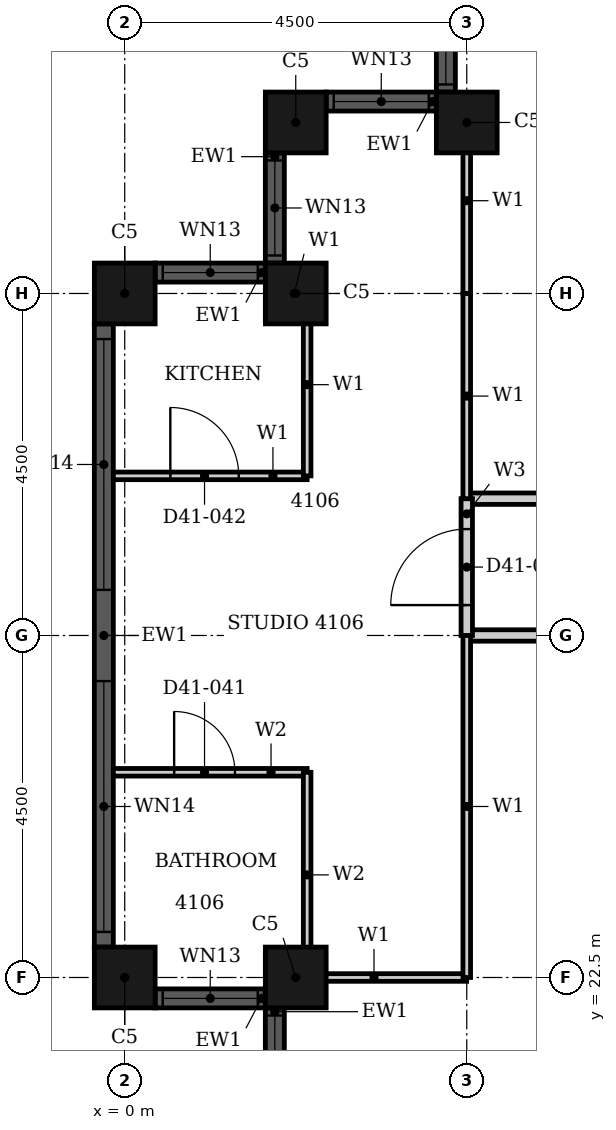
"""IFC4 building model, lengths in metres.
Left out: names, types, materials, properties, quantities, classifications, styles, units other than length and angle.
Written with IfcOpenShell. Run it as: python <this file> out.ifc"""

import sys

from ifc_helpers import new_model, si_unit, direction, frame, frame_2d, origin, origin_2d, place, context, subcontext, project, spatial, rectangle, hollow_rectangle, extrude, element, fill, save


model = new_model("IFC4")
c1 = context("Model", 3, precision=1e-05, world=origin(), true_north=direction((0.0, 1.0)))
c2 = subcontext(c1, "Body", "Model", "MODEL_VIEW")
j1 = project(units=[si_unit("LENGTHUNIT", "METRE"), si_unit("PLANEANGLEUNIT", "RADIAN")], contexts=[c1])
p1 = place(None, origin())
s1 = spatial("IfcSite", under=j1, at=p1, CompositionType="ELEMENT")
p2 = place(p1, origin())
s2 = spatial("IfcBuilding", under=s1, at=p2, CompositionType="ELEMENT")
p3 = place(p2, frame((0.0, 0.0, 165.4)))
s3 = spatial("IfcBuildingStorey", under=s2, at=p3, CompositionType="ELEMENT", Elevation=165.4)
for number, where, z_axis, x_axis in (
    (1, (4.5, 33.75, 0.0), (0.0, 0.0, 1.0), (1.0, 0.0, 0.0)),
    (2, (2.25, 33.75, 0.0), (0.0, 0.0, 1.0), (1.0, 0.0, 0.0)),
    (3, (2.25, 31.5, 0.0), (0.0, 0.0, 1.0), (1.0, 0.0, 0.0)),
    (4, (0.0, 31.5, 0.0), (0.0, 0.0, 1.0), (1.0, 0.0, 0.0)),
    (5, (0.0, 22.5, 0.0), (0.0, 0.0, 1.0), (1.0, 0.0, 0.0)),
    (6, (2.25, 22.5, 0.0), (0.0, 0.0, 1.0), (1.0, 0.0, 0.0)),
):
    element("IfcColumn", number, at=place(p3, frame(where, z_axis=z_axis, x_axis=x_axis)), inside=s3, PredefinedType="COLUMN", context=c2, shape_type="SweptSolid", body=[
        extrude(hollow_rectangle(XDim=0.8, YDim=0.8, WallThickness=0.025, at=origin_2d()), origin(), (0.0, 0.0, 1.0), 3.7),
    ])
p4 = place(p3, frame((4.225, 35.6, 0.0), z_axis=(0.0, 0.0, 1.0), x_axis=(0.0, -1.0, 0.0)))
e7 = element("IfcWall", 7, at=p4, inside=s3, PredefinedType="SOLIDWALL", context=c2, shape_type="SweptSolid", body=[
    extrude(rectangle(XDim=1.45, YDim=0.25, at=frame_2d((0.725, 0.0))), origin(), (0.0, 0.0, 1.0), 3.7),
])
p5 = place(p4, frame((0.1, 0.0, 0.9)))
e8 = element("IfcOpeningElement", 8, at=p5, cuts=e7, PredefinedType="OPENING", context=c2, shape_type="SweptSolid", body=[
    extrude(rectangle(XDim=1.25, YDim=2.08, at=frame_2d((0.625, 1.04))), frame((0.0, 0.135, 0.0), z_axis=(0.0, -1.0, 0.0), x_axis=(1.0, 0.0, 0.0)), (0.0, 0.0, 1.0), 0.27),
])
p6 = place(p3, frame((4.1, 34.025, 0.0), z_axis=(0.0, 0.0, 1.0), x_axis=(-1.0, 0.0, 0.0)))
e9 = element("IfcWall", 9, at=p6, inside=s3, PredefinedType="SOLIDWALL", context=c2, shape_type="SweptSolid", body=[
    extrude(rectangle(XDim=1.45, YDim=0.25, at=frame_2d((0.725, 0.0))), origin(), (0.0, 0.0, 1.0), 3.7),
])
p7 = place(p6, frame((0.1, 0.0, 0.9)))
e10 = element("IfcOpeningElement", 10, at=p7, cuts=e9, PredefinedType="OPENING", context=c2, shape_type="SweptSolid", body=[
    extrude(rectangle(XDim=1.25, YDim=1.85, at=frame_2d((0.625, 0.925))), frame((0.0, 0.135, 0.0), z_axis=(0.0, -1.0, 0.0), x_axis=(1.0, 0.0, 0.0)), (0.0, 0.0, 1.0), 0.27),
])
p8 = place(p3, frame((1.975, 33.35, 0.0), z_axis=(0.0, 0.0, 1.0), x_axis=(0.0, -1.0, 0.0)))
e11 = element("IfcWall", 11, at=p8, inside=s3, PredefinedType="SOLIDWALL", context=c2, shape_type="SweptSolid", body=[
    extrude(rectangle(XDim=1.45, YDim=0.25, at=frame_2d((0.725, 0.0))), origin(), (0.0, 0.0, 1.0), 3.7),
])
p9 = place(p8, frame((0.1, 0.0, 0.9)))
e12 = element("IfcOpeningElement", 12, at=p9, cuts=e11, PredefinedType="OPENING", context=c2, shape_type="SweptSolid", body=[
    extrude(rectangle(XDim=1.25, YDim=1.85, at=frame_2d((0.625, 0.925))), frame((0.0, 0.135, 0.0), z_axis=(0.0, -1.0, 0.0), x_axis=(1.0, 0.0, 0.0)), (0.0, 0.0, 1.0), 0.27),
])
p10 = place(p3, frame((1.85, 31.775, 0.0), z_axis=(0.0, 0.0, 1.0), x_axis=(-1.0, 0.0, 0.0)))
e13 = element("IfcWall", 13, at=p10, inside=s3, PredefinedType="SOLIDWALL", context=c2, shape_type="SweptSolid", body=[
    extrude(rectangle(XDim=1.45, YDim=0.25, at=frame_2d((0.725, 0.0))), origin(), (0.0, 0.0, 1.0), 3.7),
])
p11 = place(p10, frame((0.1, 0.0, 0.9)))
e14 = element("IfcOpeningElement", 14, at=p11, cuts=e13, PredefinedType="OPENING", context=c2, shape_type="SweptSolid", body=[
    extrude(rectangle(XDim=1.25, YDim=1.85, at=frame_2d((0.625, 0.925))), frame((0.0, 0.135, 0.0), z_axis=(0.0, -1.0, 0.0), x_axis=(1.0, 0.0, 0.0)), (0.0, 0.0, 1.0), 0.27),
])
p12 = place(p3, frame((-0.275, 31.1, 0.0), z_axis=(0.0, 0.0, 1.0), x_axis=(0.0, -1.0, 0.0)))
e15 = element("IfcWall", 15, at=p12, inside=s3, PredefinedType="SOLIDWALL", context=c2, shape_type="SweptSolid", body=[
    extrude(rectangle(XDim=8.2, YDim=0.25, at=frame_2d((4.1, 0.0))), origin(), (0.0, 0.0, 1.0), 3.7),
])
p13 = place(p12, frame((0.2, 0.0, 0.45)))
e16 = element("IfcOpeningElement", 16, at=p13, cuts=e15, PredefinedType="OPENING", context=c2, shape_type="SweptSolid", body=[
    extrude(rectangle(XDim=3.3, YDim=2.53, at=frame_2d((1.65, 1.265))), frame((0.0, 0.135, 0.0), z_axis=(0.0, -1.0, 0.0), x_axis=(1.0, 0.0, 0.0)), (0.0, 0.0, 1.0), 0.27),
])
p14 = place(p12, frame((4.7, 0.0, 0.45)))
e17 = element("IfcOpeningElement", 17, at=p14, cuts=e15, PredefinedType="OPENING", context=c2, shape_type="SweptSolid", body=[
    extrude(rectangle(XDim=3.3, YDim=2.53, at=frame_2d((1.65, 1.265))), frame((0.0, 0.135, 0.0), z_axis=(0.0, -1.0, 0.0), x_axis=(1.0, 0.0, 0.0)), (0.0, 0.0, 1.0), 0.27),
])
p15 = place(p3, frame((0.4, 22.225, 0.0), z_axis=(0.0, 0.0, 1.0), x_axis=(1.0, 0.0, 0.0)))
e18 = element("IfcWall", 18, at=p15, inside=s3, PredefinedType="SOLIDWALL", context=c2, shape_type="SweptSolid", body=[
    extrude(rectangle(XDim=1.45, YDim=0.25, at=frame_2d((0.725, 0.0))), origin(), (0.0, 0.0, 1.0), 3.7),
])
p16 = place(p15, frame((0.1, 0.0, 0.9)))
e19 = element("IfcOpeningElement", 19, at=p16, cuts=e18, PredefinedType="OPENING", context=c2, shape_type="SweptSolid", body=[
    extrude(rectangle(XDim=1.25, YDim=1.85, at=frame_2d((0.625, 0.925))), frame((0.0, 0.135, 0.0), z_axis=(0.0, -1.0, 0.0), x_axis=(1.0, 0.0, 0.0)), (0.0, 0.0, 1.0), 0.27),
])
p17 = place(p3, frame((1.975, 22.1, 0.0), z_axis=(0.0, 0.0, 1.0), x_axis=(0.0, -1.0, 0.0)))
e20 = element("IfcWall", 20, at=p17, inside=s3, PredefinedType="SOLIDWALL", context=c2, shape_type="SweptSolid", body=[
    extrude(rectangle(XDim=1.45, YDim=0.25, at=frame_2d((0.725, 0.0))), origin(), (0.0, 0.0, 1.0), 3.7),
])
p18 = place(p17, frame((0.1, 0.0, 0.9)))
e21 = element("IfcOpeningElement", 21, at=p18, cuts=e20, PredefinedType="OPENING", context=c2, shape_type="SweptSolid", body=[
    extrude(rectangle(XDim=1.25, YDim=1.85, at=frame_2d((0.625, 0.925))), frame((0.0, 0.135, 0.0), z_axis=(0.0, -1.0, 0.0), x_axis=(1.0, 0.0, 0.0)), (0.0, 0.0, 1.0), 0.27),
])
p19 = place(p3, frame((4.5, 27.0, 0.0), z_axis=(0.0, 0.0, 1.0), x_axis=(1.0, 0.0, 0.0)))
e22 = element("IfcWall", 22, at=p19, inside=s3, PredefinedType="PARTITIONING", context=c2, shape_type="SweptSolid", body=[
    extrude(rectangle(XDim=13.5, YDim=0.15, at=frame_2d((6.75, 0.0))), origin(), (0.0, 0.0, 1.0), 2.68),
])
p20 = place(p19, frame((5.35, 0.0, 0.0)))
e23 = element("IfcOpeningElement", 23, at=p20, cuts=e22, PredefinedType="OPENING", context=c2, shape_type="SweptSolid", body=[
    extrude(rectangle(XDim=1.0, YDim=2.1, at=frame_2d((0.5, 1.05))), frame((0.0, 0.085, 0.0), z_axis=(0.0, -1.0, 0.0), x_axis=(1.0, 0.0, 0.0)), (0.0, 0.0, 1.0), 0.17),
])
p21 = place(p3, frame((4.5, 28.8, 0.0), z_axis=(0.0, 0.0, 1.0), x_axis=(1.0, 0.0, 0.0)))
e24 = element("IfcWall", 24, at=p21, inside=s3, PredefinedType="PARTITIONING", context=c2, shape_type="SweptSolid", body=[
    extrude(rectangle(XDim=11.699, YDim=0.15, at=frame_2d((5.85, 0.0))), origin(), (0.0, 0.0, 1.0), 3.4),
])
p22 = place(p21, frame((4.0, 0.0, 0.0)))
e25 = element("IfcOpeningElement", 25, at=p22, cuts=e24, PredefinedType="OPENING", context=c2, shape_type="SweptSolid", body=[
    extrude(rectangle(XDim=1.0, YDim=2.1, at=frame_2d((0.5, 1.05))), frame((0.0, 0.085, 0.0), z_axis=(0.0, -1.0, 0.0), x_axis=(1.0, 0.0, 0.0)), (0.0, 0.0, 1.0), 0.17),
])
p23 = place(p3, frame((4.5, 27.0, 0.0), z_axis=(0.0, 0.0, 1.0), x_axis=(0.0, 1.0, 0.0)))
e26 = element("IfcWall", 26, at=p23, inside=s3, PredefinedType="PARTITIONING", context=c2, shape_type="SweptSolid", body=[
    extrude(rectangle(XDim=1.8, YDim=0.15, at=frame_2d((0.9, 0.0))), origin(), (0.0, 0.0, 1.0), 3.4),
])
p24 = place(p23, frame((0.4, 0.0, 0.0)))
e27 = element("IfcOpeningElement", 27, at=p24, cuts=e26, PredefinedType="OPENING", context=c2, shape_type="SweptSolid", body=[
    extrude(rectangle(XDim=1.0, YDim=2.2, at=frame_2d((0.5, 1.1))), frame((0.0, 0.085, 0.0), z_axis=(0.0, -1.0, 0.0), x_axis=(1.0, 0.0, 0.0)), (0.0, 0.0, 1.0), 0.17),
])
p25 = place(p3, frame((2.06, 22.5, 0.0), z_axis=(0.0, 0.0, 1.0), x_axis=(1.0, 0.0, 0.0)))
e28 = element("IfcWall", 28, at=p25, inside=s3, PredefinedType="PARTITIONING", context=c2, shape_type="SweptSolid", body=[
    extrude(rectangle(XDim=2.439, YDim=0.1, at=frame_2d((1.219, 0.0))), origin(), (0.0, 0.0, 1.0), 2.68),
])
p26 = place(p3, frame((-0.15, 29.1, 0.0), z_axis=(0.0, 0.0, 1.0), x_axis=(1.0, 0.0, 0.0)))
e29 = element("IfcWall", 29, at=p26, inside=s3, PredefinedType="PARTITIONING", context=c2, shape_type="SweptSolid", body=[
    extrude(rectangle(XDim=2.55, YDim=0.1, at=frame_2d((1.275, 0.0))), origin(), (0.0, 0.0, 1.0), 3.4),
])
p27 = place(p26, frame((0.75, 0.0, 0.0)))
e30 = element("IfcOpeningElement", 30, at=p27, cuts=e29, PredefinedType="OPENING", context=c2, shape_type="SweptSolid", body=[
    extrude(rectangle(XDim=0.9, YDim=2.1, at=frame_2d((0.45, 1.05))), frame((0.0, 0.06, 0.0), z_axis=(0.0, -1.0, 0.0), x_axis=(1.0, 0.0, 0.0)), (0.0, 0.0, 1.0), 0.12),
])
p28 = place(p3, frame((2.06, 31.5, 0.0), z_axis=(0.0, 0.0, 1.0), x_axis=(1.0, 0.0, 0.0)))
e31 = element("IfcWall", 31, at=p28, inside=s3, PredefinedType="PARTITIONING", context=c2, shape_type="SweptSolid", body=[
    extrude(rectangle(XDim=0.34, YDim=0.1, at=frame_2d((0.17, 0.0))), origin(), (0.0, 0.0, 1.0), 3.4),
])
p29 = place(p3, frame((2.4, 29.1, 0.0), z_axis=(0.0, 0.0, 1.0), x_axis=(0.0, 1.0, 0.0)))
e32 = element("IfcWall", 32, at=p29, inside=s3, PredefinedType="PARTITIONING", context=c2, shape_type="SweptSolid", body=[
    extrude(rectangle(XDim=2.4, YDim=0.1, at=frame_2d((1.2, 0.0))), origin(), (0.0, 0.0, 1.0), 3.4),
])
p30 = place(p3, frame((4.5, 28.8, 0.0), z_axis=(0.0, 0.0, 1.0), x_axis=(0.0, 1.0, 0.0)))
e33 = element("IfcWall", 33, at=p30, inside=s3, PredefinedType="PARTITIONING", context=c2, shape_type="SweptSolid", body=[
    extrude(rectangle(XDim=2.7, YDim=0.1, at=frame_2d((1.35, 0.0))), origin(), (0.0, 0.0, 1.0), 3.4),
])
p31 = place(p3, frame((4.5, 31.501, 0.0), z_axis=(0.0, 0.0, 1.0), x_axis=(0.0, 1.0, 0.0)))
e34 = element("IfcWall", 34, at=p31, inside=s3, PredefinedType="PARTITIONING", context=c2, shape_type="SweptSolid", body=[
    extrude(rectangle(XDim=2.439, YDim=0.1, at=frame_2d((1.219, 0.0))), origin(), (0.0, 0.0, 1.0), 3.4),
])
p32 = place(p3, frame((4.5, 22.5, 0.0), z_axis=(0.0, 0.0, 1.0), x_axis=(0.0, 1.0, 0.0)))
e35 = element("IfcWall", 35, at=p32, inside=s3, PredefinedType="PARTITIONING", context=c2, shape_type="SweptSolid", body=[
    extrude(rectangle(XDim=4.5, YDim=0.1, at=frame_2d((2.25, 0.0))), origin(), (0.0, 0.0, 1.0), 3.4),
])
p33 = place(p3, frame((-0.15, 25.2, 0.0), z_axis=(0.0, 0.0, 1.0), x_axis=(1.0, 0.0, 0.0)))
e36 = element("IfcWall", 36, at=p33, inside=s3, PredefinedType="PARTITIONING", context=c2, shape_type="SweptSolid", body=[
    extrude(rectangle(XDim=2.55, YDim=0.1, at=frame_2d((1.275, 0.0))), origin(), (0.0, 0.0, 1.0), 3.4),
])
p34 = place(p33, frame((0.8, 0.0, 0.0)))
e37 = element("IfcOpeningElement", 37, at=p34, cuts=e36, PredefinedType="OPENING", context=c2, shape_type="SweptSolid", body=[
    extrude(rectangle(XDim=0.8, YDim=2.1, at=frame_2d((0.4, 1.05))), frame((0.0, 0.06, 0.0), z_axis=(0.0, -1.0, 0.0), x_axis=(1.0, 0.0, 0.0)), (0.0, 0.0, 1.0), 0.12),
])
p35 = place(p3, frame((2.4, 22.5, 0.0), z_axis=(0.0, 0.0, 1.0), x_axis=(0.0, 1.0, 0.0)))
e38 = element("IfcWall", 38, at=p35, inside=s3, PredefinedType="PARTITIONING", context=c2, shape_type="SweptSolid", body=[
    extrude(rectangle(XDim=2.7, YDim=0.1, at=frame_2d((1.35, 0.0))), origin(), (0.0, 0.0, 1.0), 3.4),
])
p36 = place(p5, origin())
e39 = element("IfcWindow", 39, at=p36, inside=s3, PartitioningType="SINGLE_PANEL", PredefinedType="WINDOW", context=c2, shape_type="SweptSolid", body=[
    extrude(rectangle(XDim=1.25, YDim=2.08, at=frame_2d((0.625, 1.04))), frame((0.0, 0.03, 0.0), z_axis=(0.0, -1.0, 0.0), x_axis=(1.0, 0.0, 0.0)), (0.0, 0.0, 1.0), 0.06),
])
fill(e8, e39)
p37 = place(p7, origin())
e40 = element("IfcWindow", 40, at=p37, inside=s3, PartitioningType="SINGLE_PANEL", PredefinedType="WINDOW", context=c2, shape_type="SweptSolid", body=[
    extrude(rectangle(XDim=1.25, YDim=1.85, at=frame_2d((0.625, 0.925))), frame((0.0, 0.03, 0.0), z_axis=(0.0, -1.0, 0.0), x_axis=(1.0, 0.0, 0.0)), (0.0, 0.0, 1.0), 0.06),
])
fill(e10, e40)
p38 = place(p9, origin())
e41 = element("IfcWindow", 41, at=p38, inside=s3, PartitioningType="SINGLE_PANEL", PredefinedType="WINDOW", context=c2, shape_type="SweptSolid", body=[
    extrude(rectangle(XDim=1.25, YDim=1.85, at=frame_2d((0.625, 0.925))), frame((0.0, 0.03, 0.0), z_axis=(0.0, -1.0, 0.0), x_axis=(1.0, 0.0, 0.0)), (0.0, 0.0, 1.0), 0.06),
])
fill(e12, e41)
p39 = place(p11, origin())
e42 = element("IfcWindow", 42, at=p39, inside=s3, PartitioningType="SINGLE_PANEL", PredefinedType="WINDOW", context=c2, shape_type="SweptSolid", body=[
    extrude(rectangle(XDim=1.25, YDim=1.85, at=frame_2d((0.625, 0.925))), frame((0.0, 0.03, 0.0), z_axis=(0.0, -1.0, 0.0), x_axis=(1.0, 0.0, 0.0)), (0.0, 0.0, 1.0), 0.06),
])
fill(e14, e42)
p40 = place(p13, origin())
e43 = element("IfcWindow", 43, at=p40, inside=s3, PartitioningType="SINGLE_PANEL", PredefinedType="WINDOW", context=c2, shape_type="SweptSolid", body=[
    extrude(rectangle(XDim=3.3, YDim=2.53, at=frame_2d((1.65, 1.265))), frame((0.0, 0.03, 0.0), z_axis=(0.0, -1.0, 0.0), x_axis=(1.0, 0.0, 0.0)), (0.0, 0.0, 1.0), 0.06),
])
fill(e16, e43)
p41 = place(p14, origin())
e44 = element("IfcWindow", 44, at=p41, inside=s3, PartitioningType="SINGLE_PANEL", PredefinedType="WINDOW", context=c2, shape_type="SweptSolid", body=[
    extrude(rectangle(XDim=3.3, YDim=2.53, at=frame_2d((1.65, 1.265))), frame((0.0, 0.03, 0.0), z_axis=(0.0, -1.0, 0.0), x_axis=(1.0, 0.0, 0.0)), (0.0, 0.0, 1.0), 0.06),
])
fill(e17, e44)
p42 = place(p16, origin())
e45 = element("IfcWindow", 45, at=p42, inside=s3, PartitioningType="SINGLE_PANEL", PredefinedType="WINDOW", context=c2, shape_type="SweptSolid", body=[
    extrude(rectangle(XDim=1.25, YDim=1.85, at=frame_2d((0.625, 0.925))), frame((0.0, 0.03, 0.0), z_axis=(0.0, -1.0, 0.0), x_axis=(1.0, 0.0, 0.0)), (0.0, 0.0, 1.0), 0.06),
])
fill(e19, e45)
p43 = place(p18, origin())
e46 = element("IfcWindow", 46, at=p43, inside=s3, PartitioningType="SINGLE_PANEL", PredefinedType="WINDOW", context=c2, shape_type="SweptSolid", body=[
    extrude(rectangle(XDim=1.25, YDim=1.85, at=frame_2d((0.625, 0.925))), frame((0.0, 0.03, 0.0), z_axis=(0.0, -1.0, 0.0), x_axis=(1.0, 0.0, 0.0)), (0.0, 0.0, 1.0), 0.06),
])
fill(e21, e46)
p44 = place(p24, origin())
e47 = element("IfcDoor", 47, at=p44, inside=s3, OperationType="SINGLE_SWING_LEFT", PredefinedType="DOOR", context=c2, shape_type="SweptSolid", body=[
    extrude(rectangle(XDim=1.0, YDim=2.2, at=frame_2d((0.5, 1.1))), frame((0.0, 0.025, 0.0), z_axis=(0.0, -1.0, 0.0), x_axis=(1.0, 0.0, 0.0)), (0.0, 0.0, 1.0), 0.05),
])
fill(e27, e47)
p45 = place(p34, origin())
e48 = element("IfcDoor", 48, at=p45, inside=s3, OperationType="SINGLE_SWING_LEFT", PredefinedType="DOOR", context=c2, shape_type="SweptSolid", body=[
    extrude(rectangle(XDim=0.8, YDim=2.1, at=frame_2d((0.4, 1.05))), frame((0.0, 0.025, 0.0), z_axis=(0.0, -1.0, 0.0), x_axis=(1.0, 0.0, 0.0)), (0.0, 0.0, 1.0), 0.05),
])
fill(e37, e48)
p46 = place(p27, origin())
e49 = element("IfcDoor", 49, at=p46, inside=s3, OperationType="SINGLE_SWING_LEFT", PredefinedType="DOOR", context=c2, shape_type="SweptSolid", body=[
    extrude(rectangle(XDim=0.9, YDim=2.1, at=frame_2d((0.45, 1.05))), frame((0.0, 0.025, 0.0), z_axis=(0.0, -1.0, 0.0), x_axis=(1.0, 0.0, 0.0)), (0.0, 0.0, 1.0), 0.05),
])
fill(e30, e49)
save(model, sys.argv[1])
